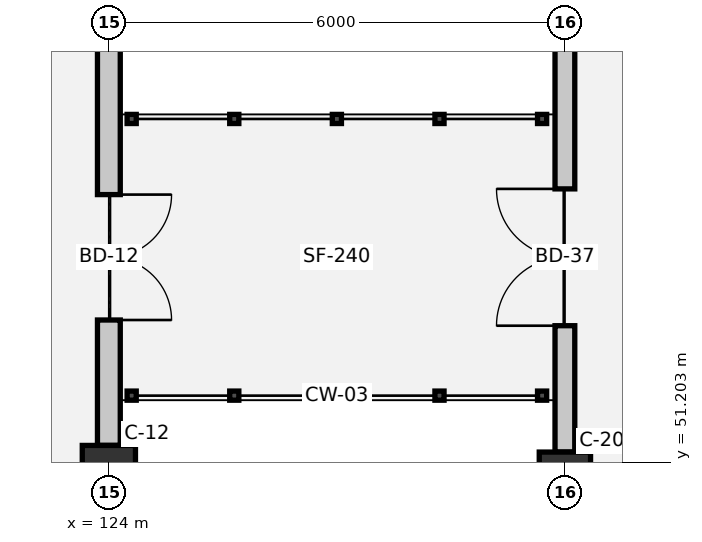
"""IFC4 building model, lengths in metres.
Left out: names, types, materials, properties, quantities, classifications, styles, units other than length and angle.
Written with IfcOpenShell. Run it as: python <this file> out.ifc"""

import sys

from ifc_helpers import new_model, si_unit, direction, frame, frame_2d, origin, origin_2d, place, context, subcontext, project, spatial, rectangle, extrude, element, fill, save


model = new_model("IFC4")
c1 = context("Model", 3, precision=1e-05, world=origin(), true_north=direction((0.0, 1.0)))
c2 = subcontext(c1, "Body", "Model", "MODEL_VIEW")
j1 = project(units=[si_unit("LENGTHUNIT", "METRE"), si_unit("PLANEANGLEUNIT", "RADIAN")], contexts=[c1])
p1 = place(None, origin())
s1 = spatial("IfcSite", under=j1, at=p1, CompositionType="ELEMENT")
p2 = place(p1, origin())
s2 = spatial("IfcBuilding", under=s1, at=p2, CompositionType="ELEMENT")
p3 = place(p2, frame((0.0, 0.0, 9.9)))
s3 = spatial("IfcBuildingStorey", under=s2, at=p3, CompositionType="ELEMENT", Elevation=9.9)
p4 = place(p3, frame((124.0, 51.0, 0.0), z_axis=(0.0, 0.0, 1.0), x_axis=(1.0, 0.0, 0.0)))
e1 = element("IfcColumn", 1, at=p4, inside=s3, PredefinedType="COLUMN", context=c2, shape_type="SweptSolid", body=[
    extrude(rectangle(XDim=0.7, YDim=0.85, at=origin_2d()), origin(), (0.0, 0.0, 1.0), 4.5),
])
p5 = place(p3, frame((130.0, 51.0, 0.0), z_axis=(0.0, 0.0, 1.0), x_axis=(1.0, 0.0, 0.0)))
e2 = element("IfcColumn", 2, at=p5, inside=s3, PredefinedType="COLUMN", context=c2, shape_type="SweptSolid", body=[
    extrude(rectangle(XDim=0.675, YDim=0.675, at=origin_2d()), origin(), (0.0, 0.0, 1.0), 4.5),
])
p6 = place(p3, frame((124.0, 64.575, 0.0), z_axis=(0.0, 0.0, 1.0), x_axis=(0.0, -1.0, 0.0)))
e3 = element("IfcWall", 3, at=p6, inside=s3, PredefinedType="SOLIDWALL", context=c2, shape_type="SweptSolid", body=[
    extrude(rectangle(XDim=13.15, YDim=0.3, at=frame_2d((6.575, 0.0))), origin(), (0.0, 0.0, 1.0), 3.23),
])
p7 = place(p6, frame((9.85, 0.0, 0.0)))
e4 = element("IfcOpeningElement", 4, at=p7, cuts=e3, PredefinedType="OPENING", context=c2, shape_type="SweptSolid", body=[
    extrude(rectangle(XDim=1.65, YDim=2.2, at=frame_2d((0.825, 1.1))), frame((0.0, 0.16, 0.0), z_axis=(0.0, -1.0, 0.0), x_axis=(1.0, 0.0, 0.0)), (0.0, 0.0, 1.0), 0.32),
])
p8 = place(p3, frame((130.0, 51.337, 0.0), z_axis=(0.0, 0.0, 1.0), x_axis=(0.0, 1.0, 0.0)))
e5 = element("IfcWall", 5, at=p8, inside=s3, PredefinedType="SOLIDWALL", context=c2, shape_type="SweptSolid", body=[
    extrude(rectangle(XDim=13.325, YDim=0.26, at=frame_2d((6.663, 0.0))), origin(), (0.0, 0.0, 1.0), 3.23),
])
p9 = place(p8, frame((1.663, 0.0, 0.0)))
e6 = element("IfcOpeningElement", 6, at=p9, cuts=e5, PredefinedType="OPENING", context=c2, shape_type="SweptSolid", body=[
    extrude(rectangle(XDim=1.8, YDim=2.25, at=frame_2d((0.9, 1.125))), frame((0.0, 0.14, 0.0), z_axis=(0.0, -1.0, 0.0), x_axis=(1.0, 0.0, 0.0)), (0.0, 0.0, 1.0), 0.28),
])
p10 = place(p7, origin())
e7 = element("IfcDoor", 7, at=p10, inside=s3, OperationType="DOUBLE_DOOR_SINGLE_SWING", PredefinedType="DOOR", context=c2, shape_type="SweptSolid", body=[
    extrude(rectangle(XDim=1.65, YDim=2.2, at=frame_2d((0.825, 1.1))), frame((0.0, 0.025, 0.0), z_axis=(0.0, -1.0, 0.0), x_axis=(1.0, 0.0, 0.0)), (0.0, 0.0, 1.0), 0.05),
])
fill(e4, e7)
p11 = place(p9, origin())
e8 = element("IfcDoor", 8, at=p11, inside=s3, OperationType="DOUBLE_DOOR_SINGLE_SWING", PredefinedType="DOOR", context=c2, shape_type="SweptSolid", body=[
    extrude(rectangle(XDim=1.8, YDim=2.25, at=frame_2d((0.9, 1.125))), frame((0.0, 0.025, 0.0), z_axis=(0.0, -1.0, 0.0), x_axis=(1.0, 0.0, 0.0)), (0.0, 0.0, 1.0), 0.05),
])
fill(e6, e8)
save(model, sys.argv[1])
